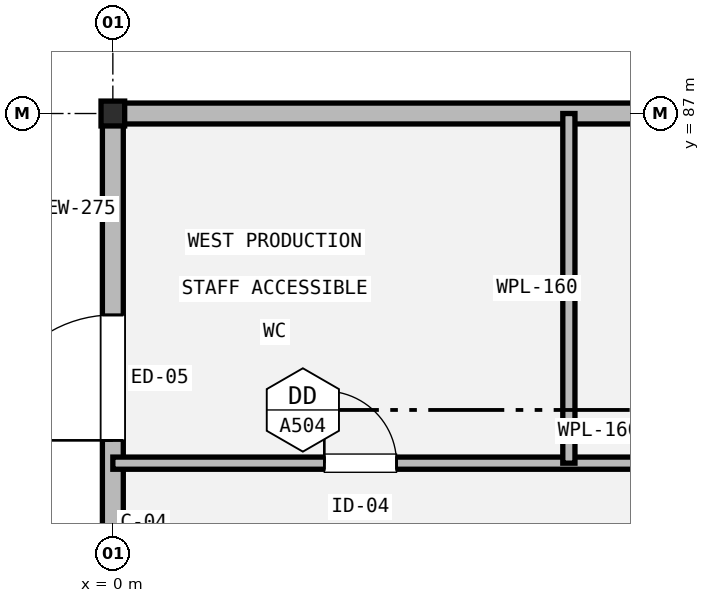
"""IFC4 building model, lengths in metres.
Left out: names, types, materials, properties, quantities, classifications, styles, units other than length and angle.
Written with IfcOpenShell. Run it as: python <this file> out.ifc"""

import sys

from ifc_helpers import new_model, si_unit, direction, frame, frame_2d, origin, origin_2d, place, context, subcontext, project, spatial, rectangle, i_section, extrude, element, fill, save


model = new_model("IFC4")
c1 = context("Model", 3, precision=1e-05, world=origin(), true_north=direction((0.0, 1.0)))
c2 = subcontext(c1, "Body", "Model", "MODEL_VIEW")
j1 = project(units=[si_unit("LENGTHUNIT", "METRE"), si_unit("PLANEANGLEUNIT", "RADIAN")], contexts=[c1])
p1 = place(None, origin())
s1 = spatial("IfcSite", under=j1, at=p1, CompositionType="ELEMENT")
p2 = place(p1, origin())
s2 = spatial("IfcBuilding", under=s1, at=p2, CompositionType="ELEMENT")
p3 = place(p2, origin())
s3 = spatial("IfcBuildingStorey", under=s2, at=p3, CompositionType="ELEMENT", Elevation=0.0)
p4 = place(p3, frame((0.0, 87.0, 0.0), z_axis=(0.0, 0.0, 1.0), x_axis=(1.0, 0.0, 0.0)))
e1 = element("IfcColumn", 1, at=p4, inside=s3, PredefinedType="COLUMN", context=c2, shape_type="SweptSolid", body=[
    extrude(i_section(OverallWidth=0.311, OverallDepth=0.327, WebThickness=0.016, FlangeThickness=0.025, FilletRadius=0.015, at=origin_2d()), origin(), (0.0, 0.0, 1.0), 5.4),
])
p5 = place(p3, frame((0.0, 80.6, 0.0), z_axis=(0.0, 0.0, 1.0), x_axis=(0.0, 1.0, 0.0)))
e2 = element("IfcWall", 2, at=p5, inside=s3, PredefinedType="STANDARD", context=c2, shape_type="SweptSolid", body=[
    extrude(rectangle(XDim=6.4, YDim=0.275, at=frame_2d((3.2, 0.0))), origin(), (0.0, 0.0, 1.0), 4.545),
])
p6 = place(p5, frame((2.1, 0.0, 0.0)))
e3 = element("IfcOpeningElement", 3, at=p6, cuts=e2, PredefinedType="OPENING", context=c2, shape_type="SweptSolid", body=[
    extrude(rectangle(XDim=1.65, YDim=2.35, at=frame_2d((0.825, 1.175))), frame((0.0, 0.147, 0.0), z_axis=(0.0, -1.0, 0.0), x_axis=(1.0, 0.0, 0.0)), (0.0, 0.0, 1.0), 0.295),
])
p7 = place(p3, frame((0.0, 87.0, 0.0), z_axis=(0.0, 0.0, 1.0), x_axis=(1.0, 0.0, 0.0)))
e4 = element("IfcWall", 4, at=p7, inside=s3, PredefinedType="STANDARD", context=c2, shape_type="SweptSolid", body=[
    extrude(rectangle(XDim=25.2, YDim=0.275, at=frame_2d((12.6, 0.0))), origin(), (0.0, 0.0, 1.0), 4.311),
])
p8 = place(p7, frame((11.5, 0.0, 0.0)))
e5 = element("IfcOpeningElement", 5, at=p8, cuts=e4, PredefinedType="OPENING", context=c2, shape_type="SweptSolid", body=[
    extrude(rectangle(XDim=3.0, YDim=3.1, at=frame_2d((1.5, 1.55))), frame((0.0, 0.147, 0.0), z_axis=(0.0, -1.0, 0.0), x_axis=(1.0, 0.0, 0.0)), (0.0, 0.0, 1.0), 0.295),
])
p9 = place(p3, frame((0.0, 82.4, 0.0), z_axis=(0.0, 0.0, 1.0), x_axis=(1.0, 0.0, 0.0)))
e6 = element("IfcWall", 6, at=p9, inside=s3, PredefinedType="PLUMBINGWALL", context=c2, shape_type="SweptSolid", body=[
    extrude(rectangle(XDim=8.9, YDim=0.16, at=frame_2d((4.45, 0.0))), origin(), (0.0, 0.0, 1.0), 4.622),
])
p10 = place(p9, frame((2.782, 0.0, 0.0)))
e7 = element("IfcOpeningElement", 7, at=p10, cuts=e6, PredefinedType="OPENING", context=c2, shape_type="SweptSolid", body=[
    extrude(rectangle(XDim=0.95, YDim=2.1, at=frame_2d((0.475, 1.05))), frame((0.0, 0.09, 0.0), z_axis=(0.0, -1.0, 0.0), x_axis=(1.0, 0.0, 0.0)), (0.0, 0.0, 1.0), 0.18),
])
p11 = place(p3, frame((6.0, 82.4, 0.0), z_axis=(0.0, 0.0, 1.0), x_axis=(0.0, 1.0, 0.0)))
e8 = element("IfcWall", 8, at=p11, inside=s3, PredefinedType="PLUMBINGWALL", context=c2, shape_type="SweptSolid", body=[
    extrude(rectangle(XDim=4.6, YDim=0.16, at=frame_2d((2.3, 0.0))), origin(), (0.0, 0.0, 1.0), 4.629),
])
p12 = place(p6, origin())
e9 = element("IfcDoor", 9, at=p12, inside=s3, OperationType="SINGLE_SWING_LEFT", PredefinedType="DOOR", context=c2, shape_type="SweptSolid", body=[
    extrude(rectangle(XDim=1.65, YDim=2.35, at=frame_2d((0.825, 1.175))), frame((0.0, 0.025, 0.0), z_axis=(0.0, -1.0, 0.0), x_axis=(1.0, 0.0, 0.0)), (0.0, 0.0, 1.0), 0.05),
])
fill(e3, e9)
p13 = place(p10, origin())
e10 = element("IfcDoor", 10, at=p13, inside=s3, OperationType="SINGLE_SWING_LEFT", PredefinedType="DOOR", context=c2, shape_type="SweptSolid", body=[
    extrude(rectangle(XDim=0.95, YDim=2.1, at=frame_2d((0.475, 1.05))), frame((0.0, 0.025, 0.0), z_axis=(0.0, -1.0, 0.0), x_axis=(1.0, 0.0, 0.0)), (0.0, 0.0, 1.0), 0.05),
])
fill(e7, e10)
save(model, sys.argv[1])
